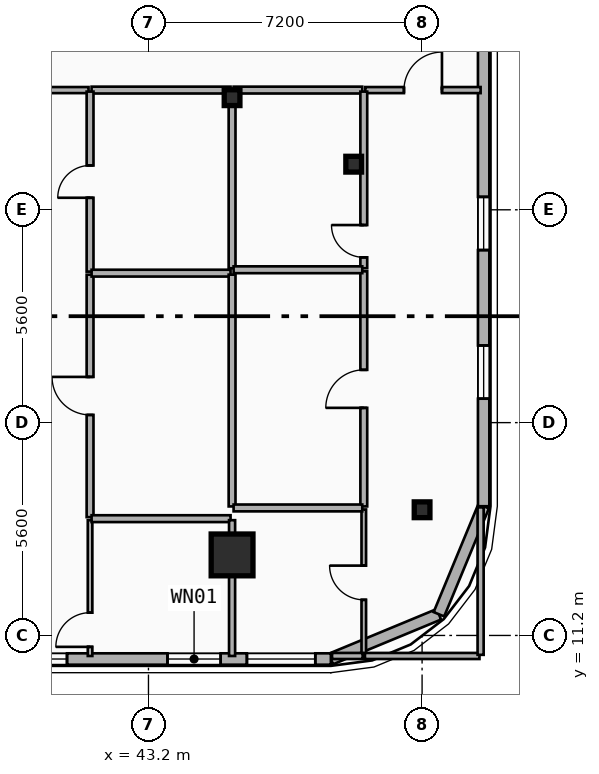
"""IFC4 building model, lengths in metres.
Left out: names, types, materials, properties, quantities, classifications, styles, units other than length and angle.
Written with IfcOpenShell. Run it as: python <this file> out.ifc"""

import sys

from ifc_helpers import new_model, si_unit, direction, frame, frame_2d, origin, origin_2d, place, context, subcontext, project, spatial, rectangle, i_section, extrude, element, fill, save


model = new_model("IFC4")
c1 = context("Model", 3, precision=1e-05, world=origin(), true_north=direction((0.0, 1.0)))
c2 = subcontext(c1, "Body", "Model", "MODEL_VIEW")
j1 = project(units=[si_unit("LENGTHUNIT", "METRE"), si_unit("PLANEANGLEUNIT", "RADIAN")], contexts=[c1])
p1 = place(None, origin())
s1 = spatial("IfcSite", under=j1, at=p1, CompositionType="ELEMENT")
p2 = place(p1, origin())
s2 = spatial("IfcBuilding", under=s1, at=p2, CompositionType="ELEMENT")
p3 = place(p2, frame((0.0, 0.0, 141.25)))
s3 = spatial("IfcBuildingStorey", under=s2, at=p3, CompositionType="ELEMENT", Elevation=141.25)
p4 = place(p3, frame((45.4, 25.35, 0.0), z_axis=(0.0, 0.0, 1.0), x_axis=(1.0, 0.0, 0.0)))
e1 = element("IfcColumn", 1, at=p4, inside=s3, PredefinedType="COLUMN", context=c2, shape_type="SweptSolid", body=[
    extrude(i_section(OverallWidth=0.413, OverallDepth=0.415, WebThickness=0.03, FlangeThickness=0.047, FilletRadius=0.015, at=origin_2d()), origin(), (0.0, 0.0, 1.0), 3.55),
])
p5 = place(p3, frame((45.4, 13.428, 0.0), z_axis=(0.0, -0.0902702026, 0.995917311087), x_axis=(1.0, 0.0, 0.0)))
e2 = element("IfcColumn", 2, at=p5, inside=s3, PredefinedType="COLUMN", context=c2, shape_type="SweptSolid", body=[
    extrude(rectangle(XDim=1.1, YDim=1.1, at=origin_2d()), origin(), (0.0, 0.0, 1.0), 3.565),
])
p6 = place(p3, frame((48.6, 23.6, 0.0), z_axis=(0.0, 0.0, 1.0), x_axis=(1.0, 0.0, 0.0)))
e3 = element("IfcColumn", 3, at=p6, inside=s3, PredefinedType="COLUMN", context=c2, shape_type="SweptSolid", body=[
    extrude(i_section(OverallWidth=0.413, OverallDepth=0.415, WebThickness=0.03, FlangeThickness=0.047, FilletRadius=0.015, at=origin_2d()), origin(), (0.0, 0.0, 1.0), 3.55),
])
p7 = place(p3, frame((50.4, 14.603, 0.0), z_axis=(0.0, -0.079930493943, 0.996800439475), x_axis=(1.0, 0.0, 0.0)))
e4 = element("IfcColumn", 4, at=p7, inside=s3, PredefinedType="COLUMN", context=c2, shape_type="SweptSolid", body=[
    extrude(i_section(OverallWidth=0.413, OverallDepth=0.415, WebThickness=0.03, FlangeThickness=0.047, FilletRadius=0.015, at=origin_2d()), origin(), (0.0, 0.0, 1.0), 3.562),
])
p8 = place(p3, frame((50.843, 11.757, 0.0), z_axis=(0.0, 0.0, 1.0), x_axis=(-0.92389884758, -0.382636798336, 0.0)))
e5 = element("IfcWall", 5, at=p8, inside=s3, PredefinedType="SOLIDWALL", context=c2, shape_type="SweptSolid", body=[
    extrude(rectangle(XDim=3.077, YDim=0.3, at=frame_2d((1.538, 0.0))), origin(), (0.0, 0.0, 1.0), 3.29),
])
p9 = place(p3, frame((52.02, 14.6, 0.0), z_axis=(0.0, 0.0, 1.0), x_axis=(-0.382676475685, -0.923882414032, 0.0)))
e6 = element("IfcWall", 6, at=p9, inside=s3, PredefinedType="SOLIDWALL", context=c2, shape_type="SweptSolid", body=[
    extrude(rectangle(XDim=3.077, YDim=0.3, at=frame_2d((1.539, 0.0))), origin(), (0.0, 0.0, 1.0), 3.29),
])
p10 = place(p3, frame((52.02, 37.6, 0.0), z_axis=(0.0, 0.0, 1.0), x_axis=(0.0, -1.0, 0.0)))
e7 = element("IfcWall", 7, at=p10, inside=s3, PredefinedType="SOLIDWALL", context=c2, shape_type="SweptSolid", body=[
    extrude(rectangle(XDim=23.0, YDim=0.3, at=frame_2d((11.5, 0.0))), origin(), (0.0, 0.0, 1.0), 3.29),
])
p11 = place(p10, frame((2.513, 0.0, 0.34)))
e8 = element("IfcOpeningElement", 8, at=p11, cuts=e7, PredefinedType="OPENING", context=c2, shape_type="SweptSolid", body=[
    extrude(rectangle(XDim=1.4, YDim=2.1, at=frame_2d((0.7, 1.05))), frame((0.0, 0.16, 0.0), z_axis=(0.0, -1.0, 0.0), x_axis=(1.0, 0.0, 0.0)), (0.0, 0.0, 1.0), 0.32),
])
p12 = place(p10, frame((6.107, 0.0, 0.34)))
e9 = element("IfcOpeningElement", 9, at=p12, cuts=e7, PredefinedType="OPENING", context=c2, shape_type="SweptSolid", body=[
    extrude(rectangle(XDim=1.4, YDim=2.1, at=frame_2d((0.7, 1.05))), frame((0.0, 0.16, 0.0), z_axis=(0.0, -1.0, 0.0), x_axis=(1.0, 0.0, 0.0)), (0.0, 0.0, 1.0), 0.32),
])
p13 = place(p10, frame((14.86, 0.0, 0.34)))
e10 = element("IfcOpeningElement", 10, at=p13, cuts=e7, PredefinedType="OPENING", context=c2, shape_type="SweptSolid", body=[
    extrude(rectangle(XDim=1.4, YDim=2.1, at=frame_2d((0.7, 1.05))), frame((0.0, 0.16, 0.0), z_axis=(0.0, -1.0, 0.0), x_axis=(1.0, 0.0, 0.0)), (0.0, 0.0, 1.0), 0.32),
])
p14 = place(p10, frame((18.77, 0.0, 0.34)))
e11 = element("IfcOpeningElement", 11, at=p14, cuts=e7, PredefinedType="OPENING", context=c2, shape_type="SweptSolid", body=[
    extrude(rectangle(XDim=1.4, YDim=2.1, at=frame_2d((0.7, 1.05))), frame((0.0, 0.16, 0.0), z_axis=(0.0, -1.0, 0.0), x_axis=(1.0, 0.0, 0.0)), (0.0, 0.0, 1.0), 0.32),
])
p15 = place(p3, frame((48.0, 10.58, 0.0), z_axis=(0.0, 0.0, 1.0), x_axis=(-1.0, 0.0, 0.0)))
e12 = element("IfcWall", 12, at=p15, inside=s3, PredefinedType="SOLIDWALL", context=c2, shape_type="SweptSolid", body=[
    extrude(rectangle(XDim=38.4, YDim=0.3, at=frame_2d((19.2, 0.0))), origin(), (0.0, 0.0, 1.0), 3.29),
])
p16 = place(p15, frame((36.19, 0.0, 0.48)))
e13 = element("IfcOpeningElement", 13, at=p16, cuts=e12, PredefinedType="OPENING", context=c2, shape_type="SweptSolid", body=[
    extrude(rectangle(XDim=1.8, YDim=1.8, at=frame_2d((0.9, 0.9))), frame((0.0, 0.16, 0.0), z_axis=(0.0, -1.0, 0.0), x_axis=(1.0, 0.0, 0.0)), (0.0, 0.0, 1.0), 0.32),
])
p17 = place(p15, frame((30.06, 0.0, 0.68)))
e14 = element("IfcOpeningElement", 14, at=p17, cuts=e12, PredefinedType="OPENING", context=c2, shape_type="SweptSolid", body=[
    extrude(rectangle(XDim=1.2, YDim=1.5, at=frame_2d((0.6, 0.75))), frame((0.0, 0.16, 0.0), z_axis=(0.0, -1.0, 0.0), x_axis=(1.0, 0.0, 0.0)), (0.0, 0.0, 1.0), 0.32),
])
p18 = place(p15, frame((25.619, 0.0, 0.34)))
e15 = element("IfcOpeningElement", 15, at=p18, cuts=e12, PredefinedType="OPENING", context=c2, shape_type="SweptSolid", body=[
    extrude(rectangle(XDim=1.6, YDim=1.95, at=frame_2d((0.8, 0.975))), frame((0.0, 0.16, 0.0), z_axis=(0.0, -1.0, 0.0), x_axis=(1.0, 0.0, 0.0)), (0.0, 0.0, 1.0), 0.32),
])
p19 = place(p15, frame((32.63, 0.0, 0.65)))
e16 = element("IfcOpeningElement", 16, at=p19, cuts=e12, PredefinedType="OPENING", context=c2, shape_type="SweptSolid", body=[
    extrude(rectangle(XDim=2.1, YDim=2.1, at=frame_2d((1.05, 1.05))), frame((0.0, 0.16, 0.0), z_axis=(0.0, -1.0, 0.0), x_axis=(1.0, 0.0, 0.0)), (0.0, 0.0, 1.0), 0.32),
])
p20 = place(p15, frame((20.1, 0.0, 0.65)))
e17 = element("IfcOpeningElement", 17, at=p20, cuts=e12, PredefinedType="OPENING", context=c2, shape_type="SweptSolid", body=[
    extrude(rectangle(XDim=2.1, YDim=2.1, at=frame_2d((1.05, 1.05))), frame((0.0, 0.16, 0.0), z_axis=(0.0, -1.0, 0.0), x_axis=(1.0, 0.0, 0.0)), (0.0, 0.0, 1.0), 0.32),
])
p21 = place(p15, frame((22.95, 0.0, 0.8)))
e18 = element("IfcOpeningElement", 18, at=p21, cuts=e12, PredefinedType="OPENING", context=c2, shape_type="SweptSolid", body=[
    extrude(rectangle(XDim=1.8, YDim=1.8, at=frame_2d((0.9, 0.9))), frame((0.0, 0.16, 0.0), z_axis=(0.0, -1.0, 0.0), x_axis=(1.0, 0.0, 0.0)), (0.0, 0.0, 1.0), 0.32),
])
p22 = place(p15, frame((13.35, 0.0, 0.65)))
e19 = element("IfcOpeningElement", 19, at=p22, cuts=e12, PredefinedType="OPENING", context=c2, shape_type="SweptSolid", body=[
    extrude(rectangle(XDim=2.1, YDim=2.1, at=frame_2d((1.05, 1.05))), frame((0.0, 0.16, 0.0), z_axis=(0.0, -1.0, 0.0), x_axis=(1.0, 0.0, 0.0)), (0.0, 0.0, 1.0), 0.32),
])
p23 = place(p15, frame((6.944, 0.0, 0.65)))
e20 = element("IfcOpeningElement", 20, at=p23, cuts=e12, PredefinedType="OPENING", context=c2, shape_type="SweptSolid", body=[
    extrude(rectangle(XDim=2.1, YDim=2.1, at=frame_2d((1.05, 1.05))), frame((0.0, 0.16, 0.0), z_axis=(0.0, -1.0, 0.0), x_axis=(1.0, 0.0, 0.0)), (0.0, 0.0, 1.0), 0.32),
])
p24 = place(p15, frame((2.9, 0.0, 0.48)))
e21 = element("IfcOpeningElement", 21, at=p24, cuts=e12, PredefinedType="OPENING", context=c2, shape_type="SweptSolid", body=[
    extrude(rectangle(XDim=1.4, YDim=1.8, at=frame_2d((0.7, 0.9))), frame((0.0, 0.16, 0.0), z_axis=(0.0, -1.0, 0.0), x_axis=(1.0, 0.0, 0.0)), (0.0, 0.0, 1.0), 0.32),
])
p25 = place(p15, frame((0.41, 0.0, 0.48)))
e22 = element("IfcOpeningElement", 22, at=p25, cuts=e12, PredefinedType="OPENING", context=c2, shape_type="SweptSolid", body=[
    extrude(rectangle(XDim=1.8, YDim=1.8, at=frame_2d((0.9, 0.9))), frame((0.0, 0.16, 0.0), z_axis=(0.0, -1.0, 0.0), x_axis=(1.0, 0.0, 0.0)), (0.0, 0.0, 1.0), 0.32),
])
p26 = place(p3, frame((38.39, 25.55, 0.0), z_axis=(0.0, 0.0, 1.0), x_axis=(1.0, 0.0, 0.0)))
e23 = element("IfcWall", 23, at=p26, inside=s3, PredefinedType="PARTITIONING", context=c2, shape_type="SweptSolid", body=[
    extrude(rectangle(XDim=3.233, YDim=0.16, at=frame_2d((1.617, 0.0))), origin(), (0.0, 0.0, 1.0), 3.29),
])
p27 = place(p26, frame((1.116, 0.0, 0.0)))
e24 = element("IfcOpeningElement", 24, at=p27, cuts=e23, PredefinedType="OPENING", context=c2, shape_type="SweptSolid", body=[
    extrude(rectangle(XDim=1.0, YDim=2.15, at=frame_2d((0.5, 1.075))), frame((0.0, 0.09, 0.0), z_axis=(0.0, -1.0, 0.0), x_axis=(1.0, 0.0, 0.0)), (0.0, 0.0, 1.0), 0.18),
])
p28 = place(p3, frame((41.703, 25.55, 0.0), z_axis=(0.0, 0.0, 1.0), x_axis=(1.0, 0.0, 0.0)))
e25 = element("IfcWall", 25, at=p28, inside=s3, PredefinedType="PLUMBINGWALL", context=c2, shape_type="SweptSolid", body=[
    extrude(rectangle(XDim=3.657, YDim=0.18, at=frame_2d((1.829, 0.0))), origin(), (0.0, 0.0, 1.0), 2.456),
])
p29 = place(p3, frame((48.906, 25.55, 0.0), z_axis=(0.0, 0.0, 1.0), x_axis=(1.0, 0.0, 0.0)))
e26 = element("IfcWall", 26, at=p29, inside=s3, PredefinedType="PARTITIONING", context=c2, shape_type="SweptSolid", body=[
    extrude(rectangle(XDim=3.034, YDim=0.16, at=frame_2d((1.517, 0.0))), origin(), (0.0, 0.0, 1.0), 2.62),
])
p30 = place(p29, frame((1.017, 0.0, 0.0)))
e27 = element("IfcOpeningElement", 27, at=p30, cuts=e26, PredefinedType="OPENING", context=c2, shape_type="SweptSolid", body=[
    extrude(rectangle(XDim=1.0, YDim=2.15, at=frame_2d((0.5, 1.075))), frame((0.0, 0.09, 0.0), z_axis=(0.0, -1.0, 0.0), x_axis=(1.0, 0.0, 0.0)), (0.0, 0.0, 1.0), 0.18),
])
p31 = place(p3, frame((45.44, 25.55, 0.0), z_axis=(0.0, 0.0, 1.0), x_axis=(1.0, 0.0, 0.0)))
e28 = element("IfcWall", 28, at=p31, inside=s3, PredefinedType="PLUMBINGWALL", context=c2, shape_type="SweptSolid", body=[
    extrude(rectangle(XDim=3.386, YDim=0.18, at=frame_2d((1.693, 0.0))), origin(), (0.0, 0.0, 1.0), 2.456),
])
p32 = place(p3, frame((41.663, 10.66, 0.0), z_axis=(0.0, 0.0, 1.0), x_axis=(0.0, 1.0, 0.0)))
e29 = element("IfcWall", 29, at=p32, inside=s3, PredefinedType="PARTITIONING", context=c2, shape_type="SweptSolid", body=[
    extrude(rectangle(XDim=3.573, YDim=0.12, at=frame_2d((1.787, 0.0))), origin(), (0.0, 0.0, 1.0), 2.91),
])
p33 = place(p32, frame((0.24, 0.0, 0.0)))
e30 = element("IfcOpeningElement", 30, at=p33, cuts=e29, PredefinedType="OPENING", context=c2, shape_type="SweptSolid", body=[
    extrude(rectangle(XDim=0.9, YDim=2.1, at=frame_2d((0.45, 1.05))), frame((0.0, 0.07, 0.0), z_axis=(0.0, -1.0, 0.0), x_axis=(1.0, 0.0, 0.0)), (0.0, 0.0, 1.0), 0.14),
])
p34 = place(p3, frame((41.663, 14.313, 0.0), z_axis=(0.0, 0.0, 1.0), x_axis=(0.0, 1.0, 0.0)))
e31 = element("IfcWall", 31, at=p34, inside=s3, PredefinedType="PLUMBINGWALL", context=c2, shape_type="SweptSolid", body=[
    extrude(rectangle(XDim=6.38, YDim=0.18, at=frame_2d((3.19, 0.0))), origin(), (0.0, 0.0, 1.0), 2.72),
])
p35 = place(p34, frame((2.69, 0.0, 0.0)))
e32 = element("IfcOpeningElement", 32, at=p35, cuts=e31, PredefinedType="OPENING", context=c2, shape_type="SweptSolid", body=[
    extrude(rectangle(XDim=1.0, YDim=2.15, at=frame_2d((0.5, 1.075))), frame((0.0, 0.1, 0.0), z_axis=(0.0, -1.0, 0.0), x_axis=(1.0, 0.0, 0.0)), (0.0, 0.0, 1.0), 0.2),
])
p36 = place(p3, frame((41.663, 20.773, 0.0), z_axis=(0.0, 0.0, 1.0), x_axis=(0.0, 1.0, 0.0)))
e33 = element("IfcWall", 33, at=p36, inside=s3, PredefinedType="PLUMBINGWALL", context=c2, shape_type="SweptSolid", body=[
    extrude(rectangle(XDim=4.737, YDim=0.18, at=frame_2d((2.369, 0.0))), origin(), (0.0, 0.0, 1.0), 2.88),
])
p37 = place(p36, frame((1.944, 0.0, 0.0)))
e34 = element("IfcOpeningElement", 34, at=p37, cuts=e33, PredefinedType="OPENING", context=c2, shape_type="SweptSolid", body=[
    extrude(rectangle(XDim=0.85, YDim=2.1, at=frame_2d((0.425, 1.05))), frame((0.0, 0.1, 0.0), z_axis=(0.0, -1.0, 0.0), x_axis=(1.0, 0.0, 0.0)), (0.0, 0.0, 1.0), 0.2),
])
p38 = place(p3, frame((41.703, 14.273, 0.0), z_axis=(0.0, 0.0, 1.0), x_axis=(1.0, 0.0, 0.0)))
e35 = element("IfcWall", 35, at=p38, inside=s3, PredefinedType="PLUMBINGWALL", context=c2, shape_type="SweptSolid", body=[
    extrude(rectangle(XDim=3.657, YDim=0.18, at=frame_2d((1.829, 0.0))), origin(), (0.0, 0.0, 1.0), 2.456),
])
p39 = place(p3, frame((45.4, 10.66, 0.0), z_axis=(0.0, 0.0, 1.0), x_axis=(0.0, 1.0, 0.0)))
e36 = element("IfcWall", 36, at=p39, inside=s3, PredefinedType="PARTITIONING", context=c2, shape_type="SweptSolid", body=[
    extrude(rectangle(XDim=3.573, YDim=0.16, at=frame_2d((1.787, 0.0))), origin(), (0.0, 0.0, 1.0), 2.456),
])
p40 = place(p3, frame((41.703, 20.733, 0.0), z_axis=(0.0, 0.0, 1.0), x_axis=(1.0, 0.0, 0.0)))
e37 = element("IfcWall", 37, at=p40, inside=s3, PredefinedType="PLUMBINGWALL", context=c2, shape_type="SweptSolid", body=[
    extrude(rectangle(XDim=3.657, YDim=0.18, at=frame_2d((1.829, 0.0))), origin(), (0.0, 0.0, 1.0), 2.456),
])
p41 = place(p3, frame((45.4, 14.595, 0.0), z_axis=(0.0, 0.0, 1.0), x_axis=(0.0, 1.0, 0.0)))
e38 = element("IfcWall", 38, at=p41, inside=s3, PredefinedType="PLUMBINGWALL", context=c2, shape_type="SweptSolid", body=[
    extrude(rectangle(XDim=6.098, YDim=0.18, at=frame_2d((3.049, 0.0))), origin(), (0.0, 0.0, 1.0), 2.456),
])
p42 = place(p3, frame((45.4, 20.862, 0.0), z_axis=(0.0, 0.0, 1.0), x_axis=(0.0, 1.0, 0.0)))
e39 = element("IfcWall", 39, at=p42, inside=s3, PredefinedType="PLUMBINGWALL", context=c2, shape_type="SweptSolid", body=[
    extrude(rectangle(XDim=4.648, YDim=0.18, at=frame_2d((2.324, 0.0))), origin(), (0.0, 0.0, 1.0), 2.456),
])
p43 = place(p3, frame((48.866, 10.66, 0.0), z_axis=(0.0, 0.0, 1.0), x_axis=(0.0, 1.0, 0.0)))
e40 = element("IfcWall", 40, at=p43, inside=s3, PredefinedType="PARTITIONING", context=c2, shape_type="SweptSolid", body=[
    extrude(rectangle(XDim=3.855, YDim=0.12, at=frame_2d((1.927, 0.0))), origin(), (0.0, 0.0, 1.0), 2.77),
])
p44 = place(p43, frame((1.478, 0.0, 0.0)))
e41 = element("IfcOpeningElement", 41, at=p44, cuts=e40, PredefinedType="OPENING", context=c2, shape_type="SweptSolid", body=[
    extrude(rectangle(XDim=0.9, YDim=2.1, at=frame_2d((0.45, 1.05))), frame((0.0, 0.07, 0.0), z_axis=(0.0, -1.0, 0.0), x_axis=(1.0, 0.0, 0.0)), (0.0, 0.0, 1.0), 0.14),
])
p45 = place(p3, frame((48.866, 14.595, 0.0), z_axis=(0.0, 0.0, 1.0), x_axis=(0.0, 1.0, 0.0)))
e42 = element("IfcWall", 42, at=p45, inside=s3, PredefinedType="PLUMBINGWALL", context=c2, shape_type="SweptSolid", body=[
    extrude(rectangle(XDim=6.187, YDim=0.18, at=frame_2d((3.094, 0.0))), origin(), (0.0, 0.0, 1.0), 2.77),
])
p46 = place(p45, frame((2.594, 0.0, 0.0)))
e43 = element("IfcOpeningElement", 43, at=p46, cuts=e42, PredefinedType="OPENING", context=c2, shape_type="SweptSolid", body=[
    extrude(rectangle(XDim=1.0, YDim=2.15, at=frame_2d((0.5, 1.075))), frame((0.0, 0.1, 0.0), z_axis=(0.0, -1.0, 0.0), x_axis=(1.0, 0.0, 0.0)), (0.0, 0.0, 1.0), 0.2),
])
p47 = place(p3, frame((48.866, 20.862, 0.0), z_axis=(0.0, 0.0, 1.0), x_axis=(0.0, 1.0, 0.0)))
e44 = element("IfcWall", 44, at=p47, inside=s3, PredefinedType="PLUMBINGWALL", context=c2, shape_type="SweptSolid", body=[
    extrude(rectangle(XDim=4.648, YDim=0.18, at=frame_2d((2.324, 0.0))), origin(), (0.0, 0.0, 1.0), 2.77),
])
p48 = place(p47, frame((0.287, 0.0, 0.0)))
e45 = element("IfcOpeningElement", 45, at=p48, cuts=e44, PredefinedType="OPENING", context=c2, shape_type="SweptSolid", body=[
    extrude(rectangle(XDim=0.85, YDim=2.1, at=frame_2d((0.425, 1.05))), frame((0.0, 0.1, 0.0), z_axis=(0.0, -1.0, 0.0), x_axis=(1.0, 0.0, 0.0)), (0.0, 0.0, 1.0), 0.2),
])
for number, where, z_axis, x_axis in (
    (46, (45.44, 14.555, 0.0), (0.0, 0.0, 1.0), (1.0, 0.0, 0.0)),
    (47, (45.44, 20.822, 0.0), (0.0, 0.0, 1.0), (1.0, 0.0, 0.0)),
):
    element("IfcWall", number, at=place(p3, frame(where, z_axis=z_axis, x_axis=x_axis)), inside=s3, PredefinedType="PLUMBINGWALL", context=c2, shape_type="SweptSolid", body=[
        extrude(rectangle(XDim=3.386, YDim=0.18, at=frame_2d((1.693, 0.0))), origin(), (0.0, 0.0, 1.0), 2.456),
    ])
p49 = place(p3, frame((48.896, 10.66, 0.0), z_axis=(0.0, 0.0, 1.0), x_axis=(1.0, 0.0, 0.0)))
e48 = element("IfcWall", 48, at=p49, inside=s3, PredefinedType="PARTITIONING", context=c2, shape_type="SweptSolid", body=[
    extrude(rectangle(XDim=3.014, YDim=0.16, at=frame_2d((1.507, 0.0))), origin(), (0.0, 0.0, 1.0), 3.29),
])
p50 = place(p3, frame((51.94, 10.69, 0.0), z_axis=(0.0, 0.0, 1.0), x_axis=(0.0, 1.0, 0.0)))
e49 = element("IfcWall", 49, at=p50, inside=s3, PredefinedType="PARTITIONING", context=c2, shape_type="SweptSolid", body=[
    extrude(rectangle(XDim=3.88, YDim=0.16, at=frame_2d((1.94, 0.0))), origin(), (0.0, 0.0, 1.0), 3.29),
])
p51 = place(p3, frame((48.03, 10.66, 0.0), z_axis=(0.0, 0.0, 1.0), x_axis=(1.0, 0.0, 0.0)))
e50 = element("IfcWall", 50, at=p51, inside=s3, PredefinedType="PARTITIONING", context=c2, shape_type="SweptSolid", body=[
    extrude(rectangle(XDim=0.806, YDim=0.16, at=frame_2d((0.403, 0.0))), origin(), (0.0, 0.0, 1.0), 3.29),
])
p52 = place(p13, origin())
e51 = element("IfcWindow", 51, at=p52, inside=s3, PartitioningType="SINGLE_PANEL", PredefinedType="WINDOW", context=c2, shape_type="SweptSolid", body=[
    extrude(rectangle(XDim=1.4, YDim=2.1, at=frame_2d((0.7, 1.05))), frame((0.0, 0.03, 0.0), z_axis=(0.0, -1.0, 0.0), x_axis=(1.0, 0.0, 0.0)), (0.0, 0.0, 1.0), 0.06),
])
fill(e10, e51)
p53 = place(p14, origin())
e52 = element("IfcWindow", 52, at=p53, inside=s3, PartitioningType="SINGLE_PANEL", PredefinedType="WINDOW", context=c2, shape_type="SweptSolid", body=[
    extrude(rectangle(XDim=1.4, YDim=2.1, at=frame_2d((0.7, 1.05))), frame((0.0, 0.03, 0.0), z_axis=(0.0, -1.0, 0.0), x_axis=(1.0, 0.0, 0.0)), (0.0, 0.0, 1.0), 0.06),
])
fill(e11, e52)
p54 = place(p23, origin())
e53 = element("IfcWindow", 53, at=p54, inside=s3, PartitioningType="SINGLE_PANEL", PredefinedType="WINDOW", context=c2, shape_type="SweptSolid", body=[
    extrude(rectangle(XDim=2.1, YDim=2.1, at=frame_2d((1.05, 1.05))), frame((0.0, 0.03, 0.0), z_axis=(0.0, -1.0, 0.0), x_axis=(1.0, 0.0, 0.0)), (0.0, 0.0, 1.0), 0.06),
])
fill(e20, e53)
p55 = place(p24, origin())
e54 = element("IfcWindow", 54, at=p55, inside=s3, PartitioningType="SINGLE_PANEL", PredefinedType="WINDOW", context=c2, shape_type="SweptSolid", body=[
    extrude(rectangle(XDim=1.4, YDim=1.8, at=frame_2d((0.7, 0.9))), frame((0.0, 0.03, 0.0), z_axis=(0.0, -1.0, 0.0), x_axis=(1.0, 0.0, 0.0)), (0.0, 0.0, 1.0), 0.06),
])
fill(e21, e54)
p56 = place(p25, origin())
e55 = element("IfcWindow", 55, at=p56, inside=s3, PartitioningType="SINGLE_PANEL", PredefinedType="WINDOW", context=c2, shape_type="SweptSolid", body=[
    extrude(rectangle(XDim=1.8, YDim=1.8, at=frame_2d((0.9, 0.9))), frame((0.0, 0.03, 0.0), z_axis=(0.0, -1.0, 0.0), x_axis=(1.0, 0.0, 0.0)), (0.0, 0.0, 1.0), 0.06),
])
fill(e22, e55)
p57 = place(p30, origin())
e56 = element("IfcDoor", 56, at=p57, inside=s3, OperationType="SINGLE_SWING_RIGHT", PredefinedType="DOOR", context=c2, shape_type="SweptSolid", body=[
    extrude(rectangle(XDim=1.0, YDim=2.15, at=frame_2d((0.5, 1.075))), frame((0.0, 0.025, 0.0), z_axis=(0.0, -1.0, 0.0), x_axis=(1.0, 0.0, 0.0)), (0.0, 0.0, 1.0), 0.05),
])
fill(e27, e56)
p58 = place(p33, origin())
e57 = element("IfcDoor", 57, at=p58, inside=s3, OperationType="SINGLE_SWING_LEFT", PredefinedType="DOOR", context=c2, shape_type="SweptSolid", body=[
    extrude(rectangle(XDim=0.9, YDim=2.1, at=frame_2d((0.45, 1.05))), frame((0.0, 0.025, 0.0), z_axis=(0.0, -1.0, 0.0), x_axis=(1.0, 0.0, 0.0)), (0.0, 0.0, 1.0), 0.05),
])
fill(e30, e57)
p59 = place(p35, origin())
e58 = element("IfcDoor", 58, at=p59, inside=s3, OperationType="SINGLE_SWING_RIGHT", PredefinedType="DOOR", context=c2, shape_type="SweptSolid", body=[
    extrude(rectangle(XDim=1.0, YDim=2.15, at=frame_2d((0.5, 1.075))), frame((0.0, 0.025, 0.0), z_axis=(0.0, -1.0, 0.0), x_axis=(1.0, 0.0, 0.0)), (0.0, 0.0, 1.0), 0.05),
])
fill(e32, e58)
p60 = place(p37, origin())
e59 = element("IfcDoor", 59, at=p60, inside=s3, OperationType="SINGLE_SWING_LEFT", PredefinedType="DOOR", context=c2, shape_type="SweptSolid", body=[
    extrude(rectangle(XDim=0.85, YDim=2.1, at=frame_2d((0.425, 1.05))), frame((0.0, 0.025, 0.0), z_axis=(0.0, -1.0, 0.0), x_axis=(1.0, 0.0, 0.0)), (0.0, 0.0, 1.0), 0.05),
])
fill(e34, e59)
p61 = place(p44, origin())
e60 = element("IfcDoor", 60, at=p61, inside=s3, OperationType="SINGLE_SWING_RIGHT", PredefinedType="DOOR", context=c2, shape_type="SweptSolid", body=[
    extrude(rectangle(XDim=0.9, YDim=2.1, at=frame_2d((0.45, 1.05))), frame((0.0, 0.025, 0.0), z_axis=(0.0, -1.0, 0.0), x_axis=(1.0, 0.0, 0.0)), (0.0, 0.0, 1.0), 0.05),
])
fill(e41, e60)
p62 = place(p46, origin())
e61 = element("IfcDoor", 61, at=p62, inside=s3, OperationType="SINGLE_SWING_LEFT", PredefinedType="DOOR", context=c2, shape_type="SweptSolid", body=[
    extrude(rectangle(XDim=1.0, YDim=2.15, at=frame_2d((0.5, 1.075))), frame((0.0, 0.025, 0.0), z_axis=(0.0, -1.0, 0.0), x_axis=(1.0, 0.0, 0.0)), (0.0, 0.0, 1.0), 0.05),
])
fill(e43, e61)
p63 = place(p48, origin())
e62 = element("IfcDoor", 62, at=p63, inside=s3, OperationType="SINGLE_SWING_RIGHT", PredefinedType="DOOR", context=c2, shape_type="SweptSolid", body=[
    extrude(rectangle(XDim=0.85, YDim=2.1, at=frame_2d((0.425, 1.05))), frame((0.0, 0.025, 0.0), z_axis=(0.0, -1.0, 0.0), x_axis=(1.0, 0.0, 0.0)), (0.0, 0.0, 1.0), 0.05),
])
fill(e45, e62)
save(model, sys.argv[1])
